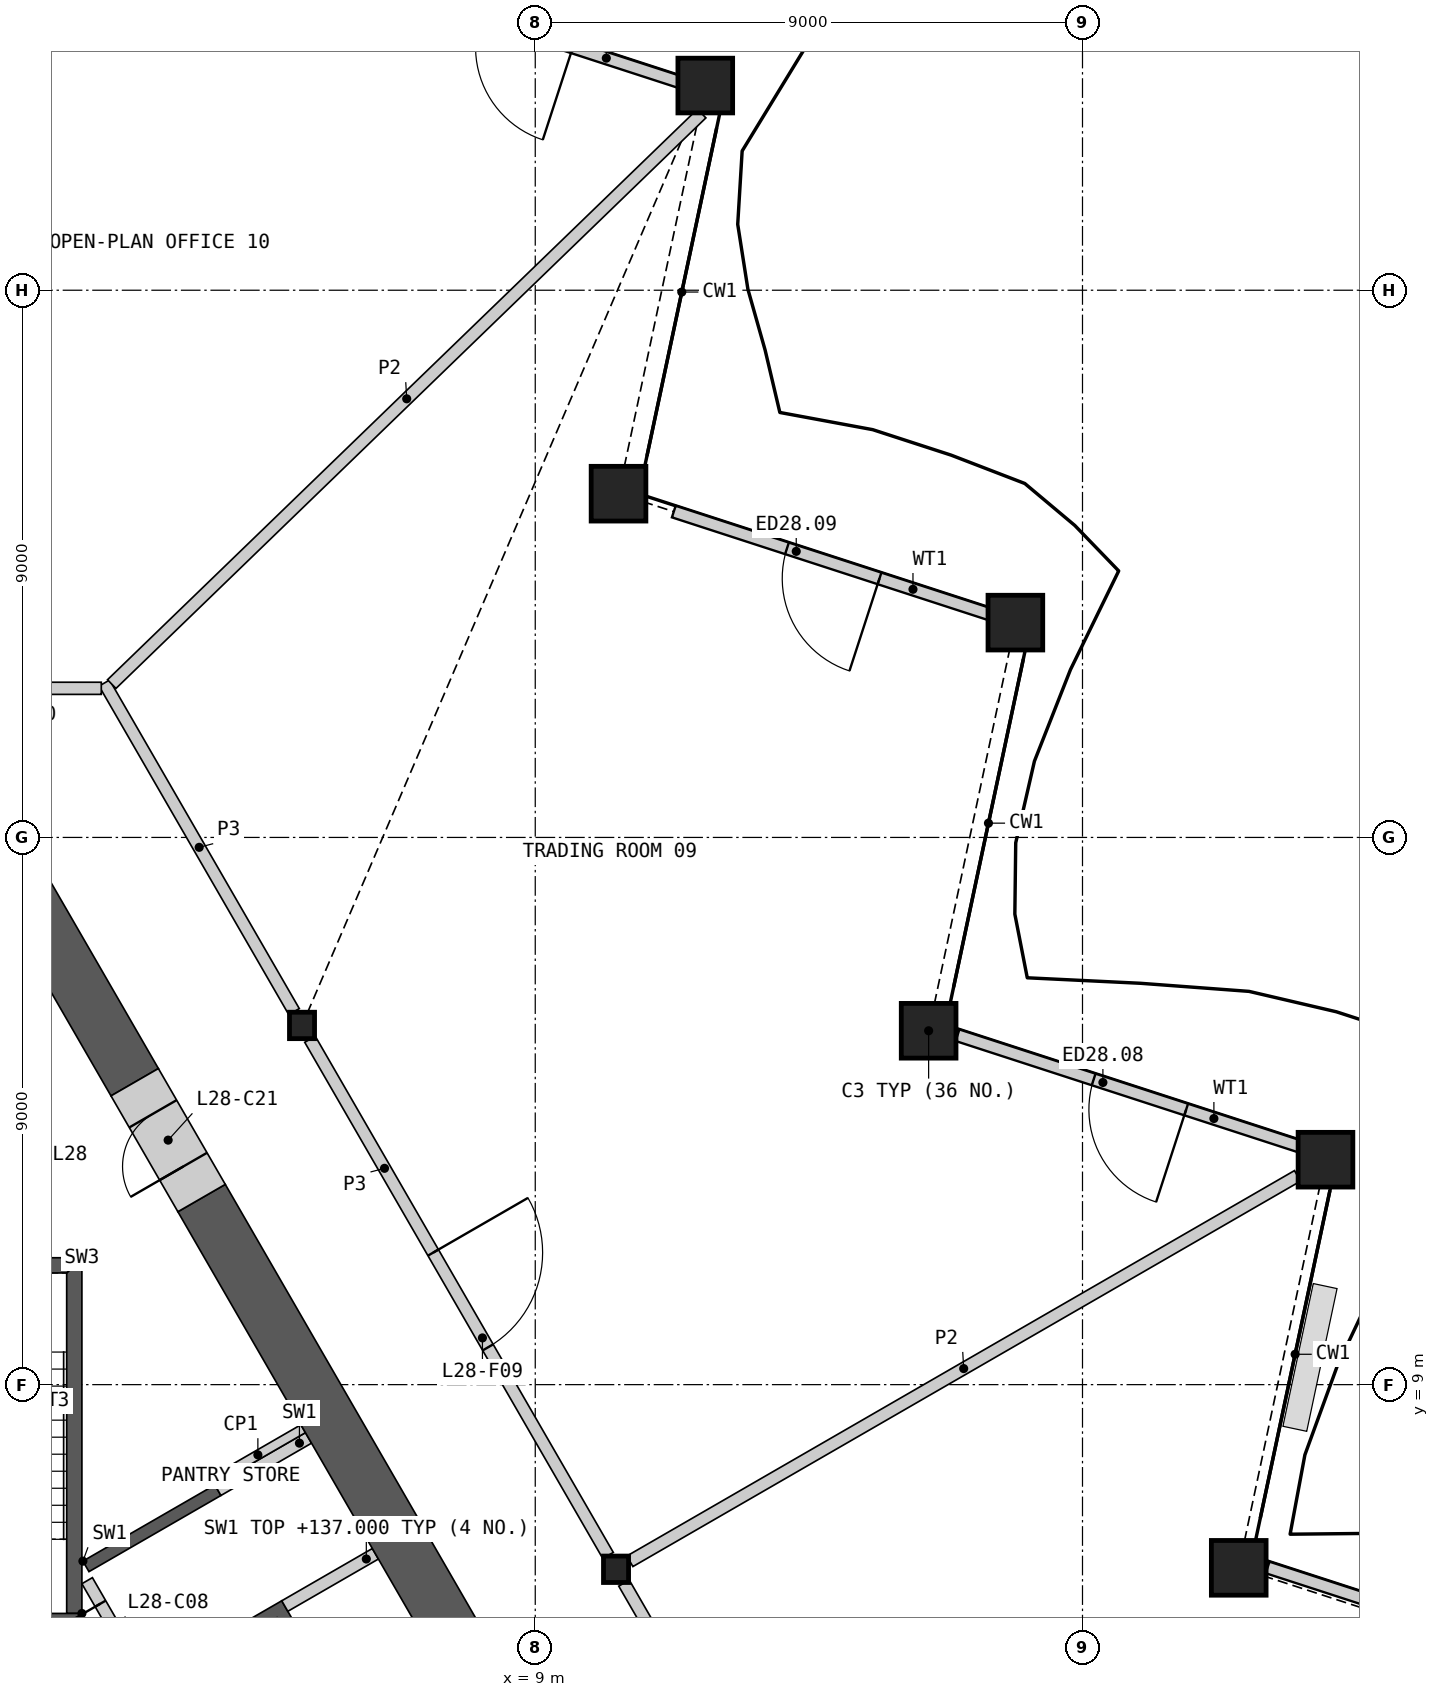
"""IFC4 building model, lengths in metres.
Left out: names, types, materials, properties, quantities, classifications, styles, units other than length and angle.
Written with IfcOpenShell. Run it as: python <this file> out.ifc"""

import sys

from ifc_helpers import new_model, si_unit, direction, frame, frame_2d, origin, origin_2d, place, context, subcontext, project, spatial, polyline, rectangle, hollow_rectangle, i_section, outline, extrude, element, fill, save


model = new_model("IFC4")
c1 = context("Model", 3, precision=1e-05, world=origin(), true_north=direction((0.0, 1.0)))
c2 = subcontext(c1, "Body", "Model", "MODEL_VIEW")
j1 = project(units=[si_unit("LENGTHUNIT", "METRE"), si_unit("PLANEANGLEUNIT", "RADIAN")], contexts=[c1])
p1 = place(None, origin())
s1 = spatial("IfcSite", under=j1, at=p1, CompositionType="ELEMENT")
p2 = place(p1, origin())
s2 = spatial("IfcBuilding", under=s1, at=p2, CompositionType="ELEMENT")
p3 = place(p2, frame((0.0, 0.0, 133.2)))
s3 = spatial("IfcBuildingStorey", under=s2, at=p3, CompositionType="ELEMENT", Elevation=133.2)
for number, where, z_axis, x_axis in (
    (1, (20.57, 5.987, 0.0), (0.0, 0.0, 1.0), (1.0, 0.0, 0.0)),
    (2, (21.996, 12.699, 0.0), (0.0, 0.0, 1.0), (1.0, 0.0, 0.0)),
    (3, (15.469, 14.82, 0.0), (0.0, 0.0, 1.0), (1.0, 0.0, 0.0)),
    (4, (16.896, 21.533, 0.0), (0.0, 0.0, 1.0), (1.0, 0.0, 0.0)),
    (5, (10.37, 23.654, 0.0), (0.0, 0.0, 1.0), (1.0, 0.0, 0.0)),
    (6, (11.796, 30.366, 0.0), (0.0, 0.0, 1.0), (1.0, 0.0, 0.0)),
):
    element("IfcColumn", number, at=place(p3, frame(where, z_axis=z_axis, x_axis=x_axis)), inside=s3, PredefinedType="COLUMN", context=c2, shape_type="SweptSolid", body=[
        extrude(hollow_rectangle(XDim=0.9, YDim=0.9, WallThickness=0.06, at=origin_2d()), origin(), (0.0, 0.0, 1.0), 4.2),
    ])
for number, where, z_axis, x_axis in (
    (7, (10.328, 5.963, 0.0), (0.0, 0.0, 1.0), (1.0, 0.0, 0.0)),
    (8, (5.164, 14.908, 0.0), (0.0, 0.0, 1.0), (1.0, 0.0, 0.0)),
):
    element("IfcColumn", number, at=place(p3, frame(where, z_axis=z_axis, x_axis=x_axis)), inside=s3, PredefinedType="COLUMN", context=c2, shape_type="SweptSolid", body=[
        extrude(i_section(OverallWidth=0.412, OverallDepth=0.435, WebThickness=0.036, FlangeThickness=0.057, at=origin_2d()), origin(), (0.0, 0.0, 1.0), 4.2),
    ])
p4 = place(p3, frame((26.622, 4.181, 0.0), z_axis=(0.0, 0.0, 1.0), x_axis=(-0.951053952554, 0.309024884649, 0.0)))
e9 = element("IfcWall", 9, at=p4, inside=s3, PredefinedType="SOLIDWALL", context=c2, shape_type="SweptSolid", body=[
    extrude(rectangle(XDim=5.865, YDim=0.2, at=frame_2d((2.932, 0.0))), origin(), (0.0, 0.0, 1.0), 3.189),
])
p5 = place(p4, frame((1.969, 0.0, 0.0)))
e10 = element("IfcOpeningElement", 10, at=p5, cuts=e9, PredefinedType="OPENING", context=c2, shape_type="SweptSolid", body=[
    extrude(rectangle(XDim=1.6, YDim=2.4, at=frame_2d((0.8, 1.2))), frame((0.0, 0.11, 0.0), z_axis=(0.0, -1.0, 0.0), x_axis=(1.0, 0.0, 0.0)), (0.0, 0.0, 1.0), 0.22),
])
p6 = place(p3, frame((21.567, 12.92, 0.0), z_axis=(0.0, 0.0, 1.0), x_axis=(-0.951051366173, 0.309032844373, 0.0)))
e11 = element("IfcWall", 11, at=p6, inside=s3, PredefinedType="SOLIDWALL", context=c2, shape_type="SweptSolid", body=[
    extrude(rectangle(XDim=5.912, YDim=0.2, at=frame_2d((2.956, 0.0))), origin(), (0.0, 0.0, 1.0), 3.189),
])
p7 = place(p6, frame((1.957, 0.0, 0.0)))
e12 = element("IfcOpeningElement", 12, at=p7, cuts=e11, PredefinedType="OPENING", context=c2, shape_type="SweptSolid", body=[
    extrude(rectangle(XDim=1.6, YDim=2.4, at=frame_2d((0.8, 1.2))), frame((0.0, 0.11, 0.0), z_axis=(0.0, -1.0, 0.0), x_axis=(1.0, 0.0, 0.0)), (0.0, 0.0, 1.0), 0.22),
])
p8 = place(p3, frame((16.523, 21.655, 0.0), z_axis=(0.0, 0.0, 1.0), x_axis=(-0.951055539332, 0.309020001142, 0.0)))
e13 = element("IfcWall", 13, at=p8, inside=s3, PredefinedType="SOLIDWALL", context=c2, shape_type="SweptSolid", body=[
    extrude(rectangle(XDim=5.515, YDim=0.2, at=frame_2d((2.757, 0.0))), origin(), (0.0, 0.0, 1.0), 3.189),
])
p9 = place(p8, frame((1.957, 0.0, 0.0)))
e14 = element("IfcOpeningElement", 14, at=p9, cuts=e13, PredefinedType="OPENING", context=c2, shape_type="SweptSolid", body=[
    extrude(rectangle(XDim=1.6, YDim=2.4, at=frame_2d((0.8, 1.2))), frame((0.0, 0.11, 0.0), z_axis=(0.0, -1.0, 0.0), x_axis=(1.0, 0.0, 0.0)), (0.0, 0.0, 1.0), 0.22),
])
p10 = place(p3, frame((11.48, 30.391, 0.0), z_axis=(0.0, 0.0, 1.0), x_axis=(-0.951055539332, 0.309020001142, 0.0)))
e15 = element("IfcWall", 15, at=p10, inside=s3, PredefinedType="SOLIDWALL", context=c2, shape_type="SweptSolid", body=[
    extrude(rectangle(XDim=5.515, YDim=0.2, at=frame_2d((2.757, 0.0))), origin(), (0.0, 0.0, 1.0), 3.189),
])
p11 = place(p10, frame((1.957, 0.0, 0.0)))
e16 = element("IfcOpeningElement", 16, at=p11, cuts=e15, PredefinedType="OPENING", context=c2, shape_type="SweptSolid", body=[
    extrude(rectangle(XDim=1.6, YDim=2.4, at=frame_2d((0.8, 1.2))), frame((0.0, 0.11, 0.0), z_axis=(0.0, -1.0, 0.0), x_axis=(1.0, 0.0, 0.0)), (0.0, 0.0, 1.0), 0.22),
])
p12 = place(p3, origin())
e17 = element("IfcWall", 17, at=p12, inside=s3, PredefinedType="SHEAR", context=c2, shape_type="SweptSolid", body=[
    extrude(outline(polyline([(1.561, 6.097), (3.731, 7.35), (3.831, 7.177), (1.66, 5.924), (1.561, 6.097)])), origin(), (0.0, 0.0, 1.0), 3.8),
])
p13 = place(p3, origin())
e18 = element("IfcWall", 18, at=p13, inside=s3, PredefinedType="SHEAR", context=c2, shape_type="SweptSolid", body=[
    extrude(outline(polyline([(2.66, 4.192), (4.831, 5.445), (8.231, -0.444), (6.061, -1.697), (5.96, -1.524), (7.952, -0.374), (6.952, 1.358), (4.96, 0.208), (4.861, 0.381), (6.852, 1.531), (5.852, 3.263), (3.861, 2.113), (3.76, 2.287), (5.752, 3.437), (4.752, 5.169), (2.76, 4.019), (2.66, 4.192)])), origin(), (0.0, 0.0, 1.0), 3.8),
])
p14 = place(p3, frame((5.817, -1.476, 0.0), z_axis=(0.0, 0.0, 1.0), x_axis=(-0.500002616675, 0.866023893041, 0.0)))
e19 = element("IfcWall", 19, at=p14, inside=s3, PredefinedType="SOLIDWALL", context=c2, shape_type="SweptSolid", body=[
    extrude(rectangle(XDim=8.373, YDim=0.2, at=frame_2d((4.187, 0.0))), origin(), (0.0, 0.0, 1.0), 3.8),
])
p15 = place(p14, frame((0.337, 0.0, 0.0)))
e20 = element("IfcOpeningElement", 20, at=p15, cuts=e19, PredefinedType="OPENING", context=c2, shape_type="SweptSolid", body=[
    extrude(rectangle(XDim=1.1, YDim=2.1, at=frame_2d((0.55, 1.05))), frame((0.0, 0.11, 0.0), z_axis=(0.0, -1.0, 0.0), x_axis=(1.0, 0.0, 0.0)), (0.0, 0.0, 1.0), 0.22),
])
p16 = place(p14, frame((2.537, 0.0, 0.0)))
e21 = element("IfcOpeningElement", 21, at=p16, cuts=e19, PredefinedType="OPENING", context=c2, shape_type="SweptSolid", body=[
    extrude(rectangle(XDim=1.1, YDim=2.1, at=frame_2d((0.55, 1.05))), frame((0.0, 0.11, 0.0), z_axis=(0.0, -1.0, 0.0), x_axis=(1.0, 0.0, 0.0)), (0.0, 0.0, 1.0), 0.22),
])
p17 = place(p14, frame((4.737, 0.0, 0.0)))
e22 = element("IfcOpeningElement", 22, at=p17, cuts=e19, PredefinedType="OPENING", context=c2, shape_type="SweptSolid", body=[
    extrude(rectangle(XDim=1.1, YDim=2.1, at=frame_2d((0.55, 1.05))), frame((0.0, 0.11, 0.0), z_axis=(0.0, -1.0, 0.0), x_axis=(1.0, 0.0, 0.0)), (0.0, 0.0, 1.0), 0.22),
])
p18 = place(p14, frame((7.037, 0.0, 0.0)))
e23 = element("IfcOpeningElement", 23, at=p18, cuts=e19, PredefinedType="OPENING", context=c2, shape_type="SweptSolid", body=[
    extrude(rectangle(XDim=0.9, YDim=2.1, at=frame_2d((0.45, 1.05))), frame((0.0, 0.11, 0.0), z_axis=(0.0, -1.0, 0.0), x_axis=(1.0, 0.0, 0.0)), (0.0, 0.0, 1.0), 0.22),
])
for number, where, z_axis, x_axis in (
    (24, (4.881, 5.358, 0.0), (0.0, 0.0, 1.0), (0.866, 0.5, 0.0)),
    (25, (3.781, 7.263, 0.0), (0.0, 0.0, 1.0), (0.866, 0.5, 0.0)),
):
    element("IfcWall", number, at=place(p3, frame(where, z_axis=z_axis, x_axis=x_axis)), inside=s3, PredefinedType="SHEAR", context=c2, shape_type="SweptSolid", body=[
        extrude(rectangle(XDim=1.72, YDim=0.2, at=frame_2d((0.86, 0.0))), origin(), (0.0, 0.0, 1.0), 3.8),
    ])
p19 = place(p3, origin())
e26 = element("IfcWall", 26, at=p19, inside=s3, PredefinedType="SHEAR", context=c2, shape_type="SweptSolid", body=[
    extrude(outline(polyline([(1.544, 5.237), (1.544, 11.087), (1.294, 10.837), (1.294, 5.237), (1.544, 5.237)])), origin(), (0.0, 0.0, 1.0), 3.8),
])
p20 = place(p3, origin())
e27 = element("IfcWall", 27, at=p20, inside=s3, PredefinedType="SHEAR", context=c2, shape_type="SweptSolid", body=[
    extrude(outline(polyline([(1.544, 11.087), (-1.544, 11.087), (-1.294, 10.837), (1.294, 10.837), (1.544, 11.087)])), origin(), (0.0, 0.0, 1.0), 3.8),
])
p21 = place(p3, frame((1.544, 5.112, 0.0), z_axis=(0.0, 0.0, 1.0), x_axis=(-1.0, 0.0, 0.0)))
e28 = element("IfcWall", 28, at=p21, inside=s3, PredefinedType="SHEAR", context=c2, shape_type="SweptSolid", body=[
    extrude(rectangle(XDim=3.088, YDim=0.25, at=frame_2d((1.544, 0.0))), origin(), (0.0, 0.0, 1.0), 3.8),
])
p22 = place(p21, frame((0.994, 0.0, 0.0)))
e29 = element("IfcOpeningElement", 29, at=p22, cuts=e28, PredefinedType="OPENING", context=c2, shape_type="SweptSolid", body=[
    extrude(rectangle(XDim=1.1, YDim=2.1, at=frame_2d((0.55, 1.05))), frame((0.0, 0.135, 0.0), z_axis=(0.0, -1.0, 0.0), x_axis=(1.0, 0.0, 0.0)), (0.0, 0.0, 1.0), 0.27),
])
p23 = place(p3, frame((3.693, 7.415, 0.0), z_axis=(0.0, 0.0, 1.0), x_axis=(0.866024871741, 0.500000921525, 0.0)))
e30 = element("IfcWall", 30, at=p23, inside=s3, PredefinedType="PARTITIONING", context=c2, shape_type="SweptSolid", body=[
    extrude(rectangle(XDim=1.72, YDim=0.15, at=frame_2d((0.86, 0.0))), origin(), (0.0, 0.0, 1.0), 3.8),
])
p24 = place(p3, frame((7.91, 4.451, 0.0), z_axis=(0.0, 0.0, 1.0), x_axis=(-0.500001962043, 0.866024270995, 0.0)))
e31 = element("IfcWall", 31, at=p24, inside=s3, PredefinedType="SHEAR", context=c2, shape_type="SweptSolid", body=[
    extrude(rectangle(XDim=8.796, YDim=0.9, at=frame_2d((4.398, 0.0))), origin(), (0.0, 0.0, 1.0), 3.8),
])
p25 = place(p3, frame((2.413, 13.974, 0.0), z_axis=(0.0, 0.0, 1.0), x_axis=(-0.500046330384, 0.865998653272, 0.0)))
e32 = element("IfcWall", 32, at=p25, inside=s3, PredefinedType="SHEAR", context=c2, shape_type="SweptSolid", body=[
    extrude(rectangle(XDim=4.045, YDim=0.9, at=frame_2d((2.023, 0.0))), origin(), (0.0, 0.0, 1.0), 3.8),
])
p26 = place(p3, frame((3.512, 12.069, 0.0), z_axis=(0.0, 0.0, 1.0), x_axis=(-0.499946605688, 0.86605622881, 0.0)))
e33 = element("IfcWall", 33, at=p26, inside=s3, PredefinedType="SHEAR", context=c2, shape_type="SweptSolid", body=[
    extrude(rectangle(XDim=2.2, YDim=0.9, at=frame_2d((1.1, 0.0))), origin(), (0.0, 0.0, 1.0), 3.8),
])
p27 = place(p26, frame((0.6, 0.0, 0.0)))
e34 = element("IfcOpeningElement", 34, at=p27, cuts=e33, PredefinedType="OPENING", context=c2, shape_type="SweptSolid", body=[
    extrude(rectangle(XDim=1.0, YDim=2.1, at=frame_2d((0.5, 1.05))), frame((0.0, 0.46, 0.0), z_axis=(0.0, -1.0, 0.0), x_axis=(1.0, 0.0, 0.0)), (0.0, 0.0, 1.0), 0.92),
])
p28 = place(p3, frame((10.46, 5.736, 0.0), z_axis=(0.0, 0.0, 1.0), x_axis=(0.500004141693, -0.866023012564, 0.0)))
e35 = element("IfcWall", 35, at=p28, inside=s3, PredefinedType="PARTITIONING", context=c2, shape_type="SweptSolid", body=[
    extrude(rectangle(XDim=9.803, YDim=0.2, at=frame_2d((4.902, 0.0))), origin(), (0.0, 0.0, 1.0), 3.8),
])
p29 = place(p28, frame((4.352, 0.0, 0.0)))
e36 = element("IfcOpeningElement", 36, at=p29, cuts=e35, PredefinedType="OPENING", context=c2, shape_type="SweptSolid", body=[
    extrude(rectangle(XDim=1.0, YDim=2.1, at=frame_2d((0.5, 1.05))), frame((0.0, 0.11, 0.0), z_axis=(0.0, -1.0, 0.0), x_axis=(1.0, 0.0, 0.0)), (0.0, 0.0, 1.0), 0.22),
])
p30 = place(p3, frame((5.295, 14.68, 0.0), z_axis=(0.0, 0.0, 1.0), x_axis=(0.500012035596, -0.866018454918, 0.0)))
e37 = element("IfcWall", 37, at=p30, inside=s3, PredefinedType="PARTITIONING", context=c2, shape_type="SweptSolid", body=[
    extrude(rectangle(XDim=9.803, YDim=0.2, at=frame_2d((4.902, 0.0))), origin(), (0.0, 0.0, 1.0), 3.8),
])
p31 = place(p30, frame((4.052, 0.0, 0.0)))
e38 = element("IfcOpeningElement", 38, at=p31, cuts=e37, PredefinedType="OPENING", context=c2, shape_type="SweptSolid", body=[
    extrude(rectangle(XDim=1.8, YDim=2.1, at=frame_2d((0.9, 1.05))), frame((0.0, 0.11, 0.0), z_axis=(0.0, -1.0, 0.0), x_axis=(1.0, 0.0, 0.0)), (0.0, 0.0, 1.0), 0.22),
])
p32 = place(p3, frame((1.913, 20.539, 0.0), z_axis=(0.0, 0.0, 1.0), x_axis=(0.499980978912, -0.866036385336, 0.0)))
e39 = element("IfcWall", 39, at=p32, inside=s3, PredefinedType="PARTITIONING", context=c2, shape_type="SweptSolid", body=[
    extrude(rectangle(XDim=6.24, YDim=0.2, at=frame_2d((3.12, 0.0))), origin(), (0.0, 0.0, 1.0), 3.8),
])
p33 = place(p3, frame((-1.863, 20.453, 0.0), z_axis=(0.0, 0.0, 1.0), x_axis=(1.0, 0.0, 0.0)))
e40 = element("IfcWall", 40, at=p33, inside=s3, PredefinedType="PARTITIONING", context=c2, shape_type="SweptSolid", body=[
    extrude(rectangle(XDim=3.726, YDim=0.2, at=frame_2d((1.863, 0.0))), origin(), (0.0, 0.0, 1.0), 3.8),
])
p34 = place(p33, frame((0.963, 0.0, 0.0)))
e41 = element("IfcOpeningElement", 41, at=p34, cuts=e40, PredefinedType="OPENING", context=c2, shape_type="SweptSolid", body=[
    extrude(rectangle(XDim=1.8, YDim=2.1, at=frame_2d((0.9, 1.05))), frame((0.0, 0.11, 0.0), z_axis=(0.0, -1.0, 0.0), x_axis=(1.0, 0.0, 0.0)), (0.0, 0.0, 1.0), 0.22),
])
p35 = place(p3, frame((2.035, 20.522, 0.0), z_axis=(0.0, 0.0, 1.0), x_axis=(0.718783474817, 0.695234001132, 0.0)))
e42 = element("IfcWall", 42, at=p35, inside=s3, PredefinedType="PARTITIONING", context=c2, shape_type="SweptSolid", body=[
    extrude(rectangle(XDim=13.498, YDim=0.2, at=frame_2d((6.749, 0.0))), origin(), (0.0, 0.0, 1.0), 2.885),
])
p36 = place(p3, frame((10.556, 6.094, 0.0), z_axis=(0.0, 0.0, 1.0), x_axis=(0.86602461759, 0.500001361726, 0.0)))
e43 = element("IfcWall", 43, at=p36, inside=s3, PredefinedType="PARTITIONING", context=c2, shape_type="SweptSolid", body=[
    extrude(rectangle(XDim=12.679, YDim=0.2, at=frame_2d((6.34, 0.0))), origin(), (0.0, 0.0, 1.0), 2.885),
])
p37 = place(p7, origin())
e44 = element("IfcDoor", 44, at=p37, inside=s3, OperationType="DOUBLE_DOOR_SINGLE_SWING", PredefinedType="DOOR", context=c2, shape_type="SweptSolid", body=[
    extrude(rectangle(XDim=1.6, YDim=2.4, at=frame_2d((0.8, 1.2))), frame((0.0, 0.025, 0.0), z_axis=(0.0, -1.0, 0.0), x_axis=(1.0, 0.0, 0.0)), (0.0, 0.0, 1.0), 0.05),
])
fill(e12, e44)
p38 = place(p9, origin())
e45 = element("IfcDoor", 45, at=p38, inside=s3, OperationType="DOUBLE_DOOR_SINGLE_SWING", PredefinedType="DOOR", context=c2, shape_type="SweptSolid", body=[
    extrude(rectangle(XDim=1.6, YDim=2.4, at=frame_2d((0.8, 1.2))), frame((0.0, 0.025, 0.0), z_axis=(0.0, -1.0, 0.0), x_axis=(1.0, 0.0, 0.0)), (0.0, 0.0, 1.0), 0.05),
])
fill(e14, e45)
p39 = place(p18, origin())
e46 = element("IfcDoor", 46, at=p39, inside=s3, OperationType="SINGLE_SWING_RIGHT", PredefinedType="DOOR", context=c2, shape_type="SweptSolid", body=[
    extrude(rectangle(XDim=0.9, YDim=2.1, at=frame_2d((0.45, 1.05))), frame((0.0, 0.025, 0.0), z_axis=(0.0, -1.0, 0.0), x_axis=(1.0, 0.0, 0.0)), (0.0, 0.0, 1.0), 0.05),
])
fill(e23, e46)
p40 = place(p27, origin())
e47 = element("IfcDoor", 47, at=p40, inside=s3, OperationType="SINGLE_SWING_LEFT", PredefinedType="DOOR", context=c2, shape_type="SweptSolid", body=[
    extrude(rectangle(XDim=1.0, YDim=2.1, at=frame_2d((0.5, 1.05))), frame((0.0, 0.205, 0.0), z_axis=(0.0, -1.0, 0.0), x_axis=(1.0, 0.0, 0.0)), (0.0, 0.0, 1.0), 0.05),
])
fill(e34, e47)
p41 = place(p31, origin())
e48 = element("IfcDoor", 48, at=p41, inside=s3, OperationType="DOUBLE_DOOR_SINGLE_SWING", PredefinedType="DOOR", context=c2, shape_type="SweptSolid", body=[
    extrude(rectangle(XDim=1.8, YDim=2.1, at=frame_2d((0.9, 1.05))), frame((0.0, 0.025, 0.0), z_axis=(0.0, -1.0, 0.0), x_axis=(1.0, 0.0, 0.0)), (0.0, 0.0, 1.0), 0.05),
])
fill(e38, e48)
save(model, sys.argv[1])
